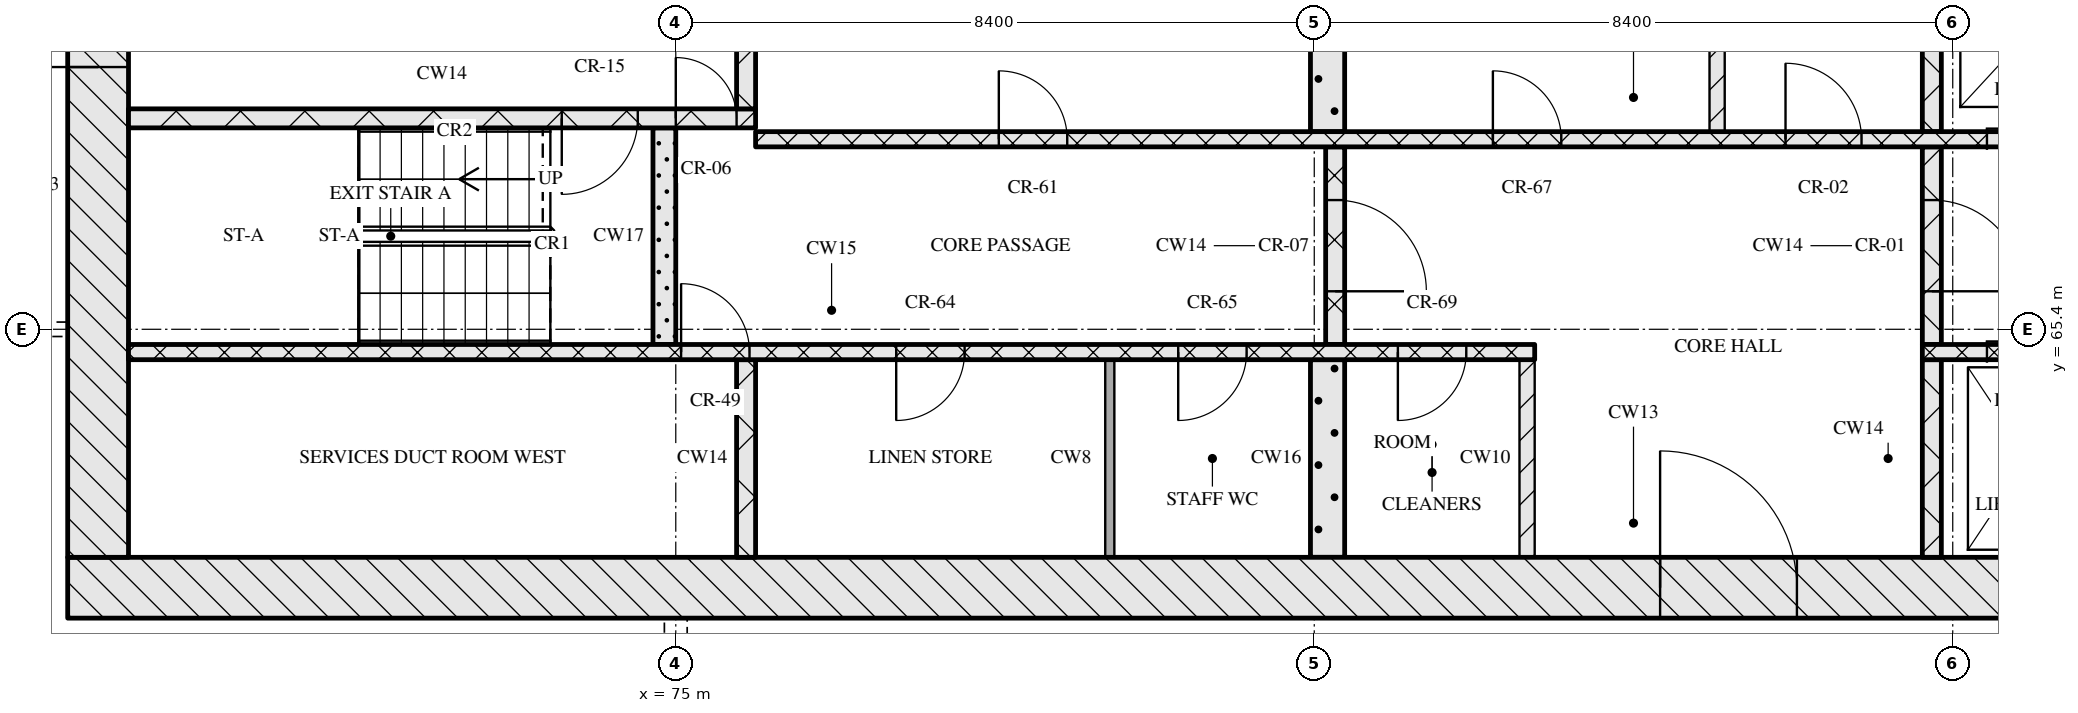
"""IFC4 building model, lengths in metres.
Left out: names, types, materials, properties, quantities, classifications, styles, units other than length and angle.
Written with IfcOpenShell. Run it as: python <this file> out.ifc"""

import sys

from ifc_helpers import new_model, si_unit, direction, frame, frame_2d, origin, place, context, subcontext, project, spatial, rectangle, extrude, element, fill, save


model = new_model("IFC4")
c1 = context("Model", 3, precision=1e-05, world=origin(), true_north=direction((0.0, 1.0)))
c2 = subcontext(c1, "Body", "Model", "MODEL_VIEW")
j1 = project(units=[si_unit("LENGTHUNIT", "METRE"), si_unit("PLANEANGLEUNIT", "RADIAN")], contexts=[c1])
p1 = place(None, origin())
s1 = spatial("IfcSite", under=j1, at=p1, CompositionType="ELEMENT")
p2 = place(p1, origin())
s2 = spatial("IfcBuilding", under=s1, at=p2, CompositionType="ELEMENT")
p3 = place(p2, frame((0.0, 0.0, 161.85)))
s3 = spatial("IfcBuildingStorey", under=s2, at=p3, CompositionType="ELEMENT", Elevation=161.85)
p4 = place(p3, frame((67.0, 62.0, 0.0), z_axis=(0.0, 0.0, 1.0), x_axis=(1.0, 0.0, 0.0)))
e1 = element("IfcWall", 1, at=p4, inside=s3, PredefinedType="SOLIDWALL", context=c2, shape_type="SweptSolid", body=[
    extrude(rectangle(XDim=41.2, YDim=0.8, at=frame_2d((20.6, 0.0))), origin(), (0.0, 0.0, 1.0), 3.32),
])
p5 = place(p4, frame((20.95, 0.0, 0.0)))
e2 = element("IfcOpeningElement", 2, at=p5, cuts=e1, PredefinedType="OPENING", context=c2, shape_type="SweptSolid", body=[
    extrude(rectangle(XDim=1.8, YDim=2.1, at=frame_2d((0.9, 1.05))), frame((0.0, 0.41, 0.0), z_axis=(0.0, -1.0, 0.0), x_axis=(1.0, 0.0, 0.0)), (0.0, 0.0, 1.0), 0.82),
])
p6 = place(p3, frame((67.4, 62.4, 0.0), z_axis=(0.0, 0.0, 1.0), x_axis=(0.0, 1.0, 0.0)))
e3 = element("IfcWall", 3, at=p6, inside=s3, PredefinedType="SOLIDWALL", context=c2, shape_type="SweptSolid", body=[
    extrude(rectangle(XDim=12.0, YDim=0.8, at=frame_2d((6.0, 0.0))), origin(), (0.0, 0.0, 1.0), 3.32),
])
p7 = place(p6, frame((6.45, 0.0, 0.0)))
e4 = element("IfcOpeningElement", 4, at=p7, cuts=e3, PredefinedType="OPENING", context=c2, shape_type="SweptSolid", body=[
    extrude(rectangle(XDim=1.2, YDim=2.1, at=frame_2d((0.6, 1.05))), frame((0.0, 0.41, 0.0), z_axis=(0.0, -1.0, 0.0), x_axis=(1.0, 0.0, 0.0)), (0.0, 0.0, 1.0), 0.82),
])
p8 = place(p3, frame((75.925, 62.4, 0.0), z_axis=(0.0, 0.0, 1.0), x_axis=(0.0, 1.0, 0.0)))
e5 = element("IfcWall", 5, at=p8, inside=s3, PredefinedType="SOLIDWALL", context=c2, shape_type="SweptSolid", body=[
    extrude(rectangle(XDim=2.6, YDim=0.25, at=frame_2d((1.3, 0.0))), origin(), (0.0, 0.0, 1.0), 3.32),
])
p9 = place(p3, frame((80.71, 62.4, 0.0), z_axis=(0.0, 0.0, 1.0), x_axis=(0.0, 1.0, 0.0)))
e6 = element("IfcWall", 6, at=p9, inside=s3, PredefinedType="PARTITIONING", context=c2, shape_type="SweptSolid", body=[
    extrude(rectangle(XDim=2.6, YDim=0.12, at=frame_2d((1.3, 0.0))), origin(), (0.0, 0.0, 1.0), 3.32),
])
p10 = place(p3, frame((83.575, 62.4, 0.0), z_axis=(0.0, 0.0, 1.0), x_axis=(0.0, 1.0, 0.0)))
e7 = element("IfcWall", 7, at=p10, inside=s3, PredefinedType="SOLIDWALL", context=c2, shape_type="SweptSolid", body=[
    extrude(rectangle(XDim=2.6, YDim=0.45, at=frame_2d((1.3, 0.0))), origin(), (0.0, 0.0, 1.0), 3.32),
])
p11 = place(p3, frame((86.2, 62.4, 0.0), z_axis=(0.0, 0.0, 1.0), x_axis=(0.0, 1.0, 0.0)))
e8 = element("IfcWall", 8, at=p11, inside=s3, PredefinedType="PARTITIONING", context=c2, shape_type="SweptSolid", body=[
    extrude(rectangle(XDim=2.6, YDim=0.2, at=frame_2d((1.3, 0.0))), origin(), (0.0, 0.0, 1.0), 3.32),
])
p12 = place(p3, frame((91.525, 62.4, 0.0), z_axis=(0.0, 0.0, 1.0), x_axis=(0.0, 1.0, 0.0)))
e9 = element("IfcWall", 9, at=p12, inside=s3, PredefinedType="SOLIDWALL", context=c2, shape_type="SweptSolid", body=[
    extrude(rectangle(XDim=2.6, YDim=0.25, at=frame_2d((1.3, 0.0))), origin(), (0.0, 0.0, 1.0), 3.32),
])
p13 = place(p3, frame((67.8, 65.1, 0.0), z_axis=(0.0, 0.0, 1.0), x_axis=(1.0, 0.0, 0.0)))
e10 = element("IfcWall", 10, at=p13, inside=s3, PredefinedType="SOLIDWALL", context=c2, shape_type="SweptSolid", body=[
    extrude(rectangle(XDim=18.5, YDim=0.2, at=frame_2d((9.25, 0.0))), origin(), (0.0, 0.0, 1.0), 3.32),
])
p14 = place(p13, frame((7.27, 0.0, 0.0)))
e11 = element("IfcOpeningElement", 11, at=p14, cuts=e10, PredefinedType="OPENING", context=c2, shape_type="SweptSolid", body=[
    extrude(rectangle(XDim=0.9, YDim=2.1, at=frame_2d((0.45, 1.05))), frame((0.0, 0.11, 0.0), z_axis=(0.0, -1.0, 0.0), x_axis=(1.0, 0.0, 0.0)), (0.0, 0.0, 1.0), 0.22),
])
p15 = place(p13, frame((10.1, 0.0, 0.0)))
e12 = element("IfcOpeningElement", 12, at=p15, cuts=e10, PredefinedType="OPENING", context=c2, shape_type="SweptSolid", body=[
    extrude(rectangle(XDim=0.9, YDim=2.1, at=frame_2d((0.45, 1.05))), frame((0.0, 0.11, 0.0), z_axis=(0.0, -1.0, 0.0), x_axis=(1.0, 0.0, 0.0)), (0.0, 0.0, 1.0), 0.22),
])
p16 = place(p13, frame((13.81, 0.0, 0.0)))
e13 = element("IfcOpeningElement", 13, at=p16, cuts=e10, PredefinedType="OPENING", context=c2, shape_type="SweptSolid", body=[
    extrude(rectangle(XDim=0.9, YDim=2.1, at=frame_2d((0.45, 1.05))), frame((0.0, 0.11, 0.0), z_axis=(0.0, -1.0, 0.0), x_axis=(1.0, 0.0, 0.0)), (0.0, 0.0, 1.0), 0.22),
])
p17 = place(p13, frame((16.7, 0.0, 0.0)))
e14 = element("IfcOpeningElement", 14, at=p17, cuts=e10, PredefinedType="OPENING", context=c2, shape_type="SweptSolid", body=[
    extrude(rectangle(XDim=0.9, YDim=2.1, at=frame_2d((0.45, 1.05))), frame((0.0, 0.11, 0.0), z_axis=(0.0, -1.0, 0.0), x_axis=(1.0, 0.0, 0.0)), (0.0, 0.0, 1.0), 0.22),
])
p18 = place(p3, frame((91.4, 65.1, 0.0), z_axis=(0.0, 0.0, 1.0), x_axis=(1.0, 0.0, 0.0)))
e15 = element("IfcWall", 15, at=p18, inside=s3, PredefinedType="SOLIDWALL", context=c2, shape_type="SweptSolid", body=[
    extrude(rectangle(XDim=16.0, YDim=0.2, at=frame_2d((8.0, 0.0))), origin(), (0.0, 0.0, 1.0), 3.32),
])
p19 = place(p18, frame((0.85, 0.0, 0.0)))
e16 = element("IfcOpeningElement", 16, at=p19, cuts=e15, PredefinedType="OPENING", context=c2, shape_type="SweptSolid", body=[
    extrude(rectangle(XDim=1.1, YDim=2.1, at=frame_2d((0.55, 1.05))), frame((0.0, 0.11, 0.0), z_axis=(0.0, -1.0, 0.0), x_axis=(1.0, 0.0, 0.0)), (0.0, 0.0, 1.0), 0.22),
])
p20 = place(p18, frame((3.35, 0.0, 0.0)))
e17 = element("IfcOpeningElement", 17, at=p20, cuts=e15, PredefinedType="OPENING", context=c2, shape_type="SweptSolid", body=[
    extrude(rectangle(XDim=1.1, YDim=2.1, at=frame_2d((0.55, 1.05))), frame((0.0, 0.11, 0.0), z_axis=(0.0, -1.0, 0.0), x_axis=(1.0, 0.0, 0.0)), (0.0, 0.0, 1.0), 0.22),
])
p21 = place(p18, frame((5.85, 0.0, 0.0)))
e18 = element("IfcOpeningElement", 18, at=p21, cuts=e15, PredefinedType="OPENING", context=c2, shape_type="SweptSolid", body=[
    extrude(rectangle(XDim=1.1, YDim=2.1, at=frame_2d((0.55, 1.05))), frame((0.0, 0.11, 0.0), z_axis=(0.0, -1.0, 0.0), x_axis=(1.0, 0.0, 0.0)), (0.0, 0.0, 1.0), 0.22),
])
p22 = place(p18, frame((7.83, 0.0, 0.0)))
e19 = element("IfcOpeningElement", 19, at=p22, cuts=e15, PredefinedType="OPENING", context=c2, shape_type="SweptSolid", body=[
    extrude(rectangle(XDim=0.9, YDim=2.1, at=frame_2d((0.45, 1.05))), frame((0.0, 0.11, 0.0), z_axis=(0.0, -1.0, 0.0), x_axis=(1.0, 0.0, 0.0)), (0.0, 0.0, 1.0), 0.22),
])
p23 = place(p3, frame((74.85, 65.2, 0.0), z_axis=(0.0, 0.0, 1.0), x_axis=(0.0, 1.0, 0.0)))
e20 = element("IfcWall", 20, at=p23, inside=s3, PredefinedType="SOLIDWALL", context=c2, shape_type="SweptSolid", body=[
    extrude(rectangle(XDim=2.85, YDim=0.3, at=frame_2d((1.425, 0.0))), origin(), (0.0, 0.0, 1.0), 3.32),
])
p24 = place(p3, frame((83.675, 65.2, 0.0), z_axis=(0.0, 0.0, 1.0), x_axis=(0.0, 1.0, 0.0)))
e21 = element("IfcWall", 21, at=p24, inside=s3, PredefinedType="SOLIDWALL", context=c2, shape_type="SweptSolid", body=[
    extrude(rectangle(XDim=2.6, YDim=0.25, at=frame_2d((1.3, 0.0))), origin(), (0.0, 0.0, 1.0), 3.32),
])
p25 = place(p24, frame((0.7, 0.0, 0.0)))
e22 = element("IfcOpeningElement", 22, at=p25, cuts=e21, PredefinedType="OPENING", context=c2, shape_type="SweptSolid", body=[
    extrude(rectangle(XDim=1.2, YDim=2.1, at=frame_2d((0.6, 1.05))), frame((0.0, 0.135, 0.0), z_axis=(0.0, -1.0, 0.0), x_axis=(1.0, 0.0, 0.0)), (0.0, 0.0, 1.0), 0.27),
])
p26 = place(p3, frame((91.525, 65.2, 0.0), z_axis=(0.0, 0.0, 1.0), x_axis=(0.0, 1.0, 0.0)))
e23 = element("IfcWall", 23, at=p26, inside=s3, PredefinedType="SOLIDWALL", context=c2, shape_type="SweptSolid", body=[
    extrude(rectangle(XDim=2.6, YDim=0.25, at=frame_2d((1.3, 0.0))), origin(), (0.0, 0.0, 1.0), 3.32),
])
p27 = place(p26, frame((0.7, 0.0, 0.0)))
e24 = element("IfcOpeningElement", 24, at=p27, cuts=e23, PredefinedType="OPENING", context=c2, shape_type="SweptSolid", body=[
    extrude(rectangle(XDim=1.2, YDim=2.1, at=frame_2d((0.6, 1.05))), frame((0.0, 0.135, 0.0), z_axis=(0.0, -1.0, 0.0), x_axis=(1.0, 0.0, 0.0)), (0.0, 0.0, 1.0), 0.27),
])
p28 = place(p3, frame((76.05, 67.9, 0.0), z_axis=(0.0, 0.0, 1.0), x_axis=(1.0, 0.0, 0.0)))
e25 = element("IfcWall", 25, at=p28, inside=s3, PredefinedType="SOLIDWALL", context=c2, shape_type="SweptSolid", body=[
    extrude(rectangle(XDim=23.1, YDim=0.2, at=frame_2d((11.55, 0.0))), origin(), (0.0, 0.0, 1.0), 3.32),
])
p29 = place(p28, frame((3.2, 0.0, 0.0)))
e26 = element("IfcOpeningElement", 26, at=p29, cuts=e25, PredefinedType="OPENING", context=c2, shape_type="SweptSolid", body=[
    extrude(rectangle(XDim=0.9, YDim=2.1, at=frame_2d((0.45, 1.05))), frame((0.0, 0.11, 0.0), z_axis=(0.0, -1.0, 0.0), x_axis=(1.0, 0.0, 0.0)), (0.0, 0.0, 1.0), 0.22),
])
p30 = place(p28, frame((9.7, 0.0, 0.0)))
e27 = element("IfcOpeningElement", 27, at=p30, cuts=e25, PredefinedType="OPENING", context=c2, shape_type="SweptSolid", body=[
    extrude(rectangle(XDim=0.9, YDim=2.1, at=frame_2d((0.45, 1.05))), frame((0.0, 0.11, 0.0), z_axis=(0.0, -1.0, 0.0), x_axis=(1.0, 0.0, 0.0)), (0.0, 0.0, 1.0), 0.22),
])
p31 = place(p28, frame((13.55, 0.0, 0.0)))
e28 = element("IfcOpeningElement", 28, at=p31, cuts=e25, PredefinedType="OPENING", context=c2, shape_type="SweptSolid", body=[
    extrude(rectangle(XDim=1.0, YDim=2.1, at=frame_2d((0.5, 1.05))), frame((0.0, 0.11, 0.0), z_axis=(0.0, -1.0, 0.0), x_axis=(1.0, 0.0, 0.0)), (0.0, 0.0, 1.0), 0.22),
])
p32 = place(p28, frame((16.2, 0.0, 0.0)))
e29 = element("IfcOpeningElement", 29, at=p32, cuts=e25, PredefinedType="OPENING", context=c2, shape_type="SweptSolid", body=[
    extrude(rectangle(XDim=1.1, YDim=2.1, at=frame_2d((0.55, 1.05))), frame((0.0, 0.11, 0.0), z_axis=(0.0, -1.0, 0.0), x_axis=(1.0, 0.0, 0.0)), (0.0, 0.0, 1.0), 0.22),
])
p33 = place(p28, frame((18.7, 0.0, 0.0)))
e30 = element("IfcOpeningElement", 30, at=p33, cuts=e25, PredefinedType="OPENING", context=c2, shape_type="SweptSolid", body=[
    extrude(rectangle(XDim=1.1, YDim=2.1, at=frame_2d((0.55, 1.05))), frame((0.0, 0.11, 0.0), z_axis=(0.0, -1.0, 0.0), x_axis=(1.0, 0.0, 0.0)), (0.0, 0.0, 1.0), 0.22),
])
p34 = place(p28, frame((21.2, 0.0, 0.0)))
e31 = element("IfcOpeningElement", 31, at=p34, cuts=e25, PredefinedType="OPENING", context=c2, shape_type="SweptSolid", body=[
    extrude(rectangle(XDim=1.1, YDim=2.1, at=frame_2d((0.55, 1.05))), frame((0.0, 0.11, 0.0), z_axis=(0.0, -1.0, 0.0), x_axis=(1.0, 0.0, 0.0)), (0.0, 0.0, 1.0), 0.22),
])
p35 = place(p3, frame((83.575, 68.0, 0.0), z_axis=(0.0, 0.0, 1.0), x_axis=(0.0, 1.0, 0.0)))
e32 = element("IfcWall", 32, at=p35, inside=s3, PredefinedType="SOLIDWALL", context=c2, shape_type="SweptSolid", body=[
    extrude(rectangle(XDim=2.6, YDim=0.45, at=frame_2d((1.3, 0.0))), origin(), (0.0, 0.0, 1.0), 3.32),
])
p36 = place(p3, frame((88.7, 68.0, 0.0), z_axis=(0.0, 0.0, 1.0), x_axis=(0.0, 1.0, 0.0)))
e33 = element("IfcWall", 33, at=p36, inside=s3, PredefinedType="PARTITIONING", context=c2, shape_type="SweptSolid", body=[
    extrude(rectangle(XDim=2.6, YDim=0.2, at=frame_2d((1.3, 0.0))), origin(), (0.0, 0.0, 1.0), 3.32),
])
p37 = place(p3, frame((91.525, 68.0, 0.0), z_axis=(0.0, 0.0, 1.0), x_axis=(0.0, 1.0, 0.0)))
e34 = element("IfcWall", 34, at=p37, inside=s3, PredefinedType="SOLIDWALL", context=c2, shape_type="SweptSolid", body=[
    extrude(rectangle(XDim=2.6, YDim=0.25, at=frame_2d((1.3, 0.0))), origin(), (0.0, 0.0, 1.0), 3.32),
])
p38 = place(p3, frame((67.8, 68.175, 0.0), z_axis=(0.0, 0.0, 1.0), x_axis=(1.0, 0.0, 0.0)))
e35 = element("IfcWall", 35, at=p38, inside=s3, PredefinedType="SOLIDWALL", context=c2, shape_type="SweptSolid", body=[
    extrude(rectangle(XDim=8.25, YDim=0.25, at=frame_2d((4.125, 0.0))), origin(), (0.0, 0.0, 1.0), 3.32),
])
p39 = place(p38, frame((5.7, 0.0, 0.0)))
e36 = element("IfcOpeningElement", 36, at=p39, cuts=e35, PredefinedType="OPENING", context=c2, shape_type="SweptSolid", body=[
    extrude(rectangle(XDim=1.0, YDim=2.1, at=frame_2d((0.5, 1.05))), frame((0.0, 0.135, 0.0), z_axis=(0.0, -1.0, 0.0), x_axis=(1.0, 0.0, 0.0)), (0.0, 0.0, 1.0), 0.27),
])
p40 = place(p38, frame((7.2, 0.0, 0.0)))
e37 = element("IfcOpeningElement", 37, at=p40, cuts=e35, PredefinedType="OPENING", context=c2, shape_type="SweptSolid", body=[
    extrude(rectangle(XDim=0.8, YDim=2.1, at=frame_2d((0.4, 1.05))), frame((0.0, 0.135, 0.0), z_axis=(0.0, -1.0, 0.0), x_axis=(1.0, 0.0, 0.0)), (0.0, 0.0, 1.0), 0.27),
])
p41 = place(p3, frame((75.925, 68.3, 0.0), z_axis=(0.0, 0.0, 1.0), x_axis=(0.0, 1.0, 0.0)))
e38 = element("IfcWall", 38, at=p41, inside=s3, PredefinedType="SOLIDWALL", context=c2, shape_type="SweptSolid", body=[
    extrude(rectangle(XDim=2.3, YDim=0.25, at=frame_2d((1.15, 0.0))), origin(), (0.0, 0.0, 1.0), 3.32),
])
p42 = place(p5, origin())
e39 = element("IfcDoor", 39, at=p42, inside=s3, OperationType="DOUBLE_DOOR_SINGLE_SWING", PredefinedType="DOOR", context=c2, shape_type="SweptSolid", body=[
    extrude(rectangle(XDim=1.8, YDim=2.1, at=frame_2d((0.9, 1.05))), frame((0.0, 0.025, 0.0), z_axis=(0.0, -1.0, 0.0), x_axis=(1.0, 0.0, 0.0)), (0.0, 0.0, 1.0), 0.05),
])
fill(e2, e39)
p43 = place(p14, origin())
e40 = element("IfcDoor", 40, at=p43, inside=s3, OperationType="SINGLE_SWING_LEFT", PredefinedType="DOOR", context=c2, shape_type="SweptSolid", body=[
    extrude(rectangle(XDim=0.9, YDim=2.1, at=frame_2d((0.45, 1.05))), frame((0.0, 0.025, 0.0), z_axis=(0.0, -1.0, 0.0), x_axis=(1.0, 0.0, 0.0)), (0.0, 0.0, 1.0), 0.05),
])
fill(e11, e40)
p44 = place(p15, origin())
e41 = element("IfcDoor", 41, at=p44, inside=s3, OperationType="SINGLE_SWING_RIGHT", PredefinedType="DOOR", context=c2, shape_type="SweptSolid", body=[
    extrude(rectangle(XDim=0.9, YDim=2.1, at=frame_2d((0.45, 1.05))), frame((0.0, 0.025, 0.0), z_axis=(0.0, -1.0, 0.0), x_axis=(1.0, 0.0, 0.0)), (0.0, 0.0, 1.0), 0.05),
])
fill(e12, e41)
p45 = place(p16, origin())
e42 = element("IfcDoor", 42, at=p45, inside=s3, OperationType="SINGLE_SWING_RIGHT", PredefinedType="DOOR", context=c2, shape_type="SweptSolid", body=[
    extrude(rectangle(XDim=0.9, YDim=2.1, at=frame_2d((0.45, 1.05))), frame((0.0, 0.025, 0.0), z_axis=(0.0, -1.0, 0.0), x_axis=(1.0, 0.0, 0.0)), (0.0, 0.0, 1.0), 0.05),
])
fill(e13, e42)
p46 = place(p17, origin())
e43 = element("IfcDoor", 43, at=p46, inside=s3, OperationType="SINGLE_SWING_RIGHT", PredefinedType="DOOR", context=c2, shape_type="SweptSolid", body=[
    extrude(rectangle(XDim=0.9, YDim=2.1, at=frame_2d((0.45, 1.05))), frame((0.0, 0.025, 0.0), z_axis=(0.0, -1.0, 0.0), x_axis=(1.0, 0.0, 0.0)), (0.0, 0.0, 1.0), 0.05),
])
fill(e14, e43)
p47 = place(p19, origin())
e44 = element("IfcDoor", 44, at=p47, inside=s3, OperationType="SLIDING_TO_LEFT", PredefinedType="DOOR", context=c2, shape_type="SweptSolid", body=[
    extrude(rectangle(XDim=1.1, YDim=2.1, at=frame_2d((0.55, 1.05))), frame((0.0, 0.025, 0.0), z_axis=(0.0, -1.0, 0.0), x_axis=(1.0, 0.0, 0.0)), (0.0, 0.0, 1.0), 0.05),
])
fill(e16, e44)
p48 = place(p25, origin())
e45 = element("IfcDoor", 45, at=p48, inside=s3, OperationType="SINGLE_SWING_RIGHT", PredefinedType="DOOR", context=c2, shape_type="SweptSolid", body=[
    extrude(rectangle(XDim=1.2, YDim=2.1, at=frame_2d((0.6, 1.05))), frame((0.0, 0.025, 0.0), z_axis=(0.0, -1.0, 0.0), x_axis=(1.0, 0.0, 0.0)), (0.0, 0.0, 1.0), 0.05),
])
fill(e22, e45)
p49 = place(p27, origin())
e46 = element("IfcDoor", 46, at=p49, inside=s3, OperationType="SINGLE_SWING_RIGHT", PredefinedType="DOOR", context=c2, shape_type="SweptSolid", body=[
    extrude(rectangle(XDim=1.2, YDim=2.1, at=frame_2d((0.6, 1.05))), frame((0.0, 0.025, 0.0), z_axis=(0.0, -1.0, 0.0), x_axis=(1.0, 0.0, 0.0)), (0.0, 0.0, 1.0), 0.05),
])
fill(e24, e46)
p50 = place(p29, origin())
e47 = element("IfcDoor", 47, at=p50, inside=s3, OperationType="SINGLE_SWING_LEFT", PredefinedType="DOOR", context=c2, shape_type="SweptSolid", body=[
    extrude(rectangle(XDim=0.9, YDim=2.1, at=frame_2d((0.45, 1.05))), frame((0.0, 0.025, 0.0), z_axis=(0.0, -1.0, 0.0), x_axis=(1.0, 0.0, 0.0)), (0.0, 0.0, 1.0), 0.05),
])
fill(e26, e47)
p51 = place(p30, origin())
e48 = element("IfcDoor", 48, at=p51, inside=s3, OperationType="SINGLE_SWING_LEFT", PredefinedType="DOOR", context=c2, shape_type="SweptSolid", body=[
    extrude(rectangle(XDim=0.9, YDim=2.1, at=frame_2d((0.45, 1.05))), frame((0.0, 0.025, 0.0), z_axis=(0.0, -1.0, 0.0), x_axis=(1.0, 0.0, 0.0)), (0.0, 0.0, 1.0), 0.05),
])
fill(e27, e48)
p52 = place(p31, origin())
e49 = element("IfcDoor", 49, at=p52, inside=s3, OperationType="SINGLE_SWING_LEFT", PredefinedType="DOOR", context=c2, shape_type="SweptSolid", body=[
    extrude(rectangle(XDim=1.0, YDim=2.1, at=frame_2d((0.5, 1.05))), frame((0.0, 0.025, 0.0), z_axis=(0.0, -1.0, 0.0), x_axis=(1.0, 0.0, 0.0)), (0.0, 0.0, 1.0), 0.05),
])
fill(e28, e49)
p53 = place(p32, origin())
e50 = element("IfcDoor", 50, at=p53, inside=s3, OperationType="SLIDING_TO_RIGHT", PredefinedType="DOOR", context=c2, shape_type="SweptSolid", body=[
    extrude(rectangle(XDim=1.1, YDim=2.1, at=frame_2d((0.55, 1.05))), frame((0.0, 0.025, 0.0), z_axis=(0.0, -1.0, 0.0), x_axis=(1.0, 0.0, 0.0)), (0.0, 0.0, 1.0), 0.05),
])
fill(e29, e50)
p54 = place(p39, origin())
e51 = element("IfcDoor", 51, at=p54, inside=s3, OperationType="SINGLE_SWING_RIGHT", PredefinedType="DOOR", context=c2, shape_type="SweptSolid", body=[
    extrude(rectangle(XDim=1.0, YDim=2.1, at=frame_2d((0.5, 1.05))), frame((0.0, 0.025, 0.0), z_axis=(0.0, -1.0, 0.0), x_axis=(1.0, 0.0, 0.0)), (0.0, 0.0, 1.0), 0.05),
])
fill(e36, e51)
p55 = place(p40, origin())
e52 = element("IfcDoor", 52, at=p55, inside=s3, OperationType="SINGLE_SWING_LEFT", PredefinedType="DOOR", context=c2, shape_type="SweptSolid", body=[
    extrude(rectangle(XDim=0.8, YDim=2.1, at=frame_2d((0.4, 1.05))), frame((0.0, 0.025, 0.0), z_axis=(0.0, -1.0, 0.0), x_axis=(1.0, 0.0, 0.0)), (0.0, 0.0, 1.0), 0.05),
])
fill(e37, e52)
p56 = place(p7, origin())
e53 = element("IfcDoor", 53, at=p56, inside=s3, OperationType="SINGLE_SWING_LEFT", PredefinedType="DOOR", context=c2, shape_type="SweptSolid", body=[
    extrude(rectangle(XDim=1.2, YDim=2.1, at=frame_2d((0.6, 1.05))), frame((0.0, 0.025, 0.0), z_axis=(0.0, -1.0, 0.0), x_axis=(1.0, 0.0, 0.0)), (0.0, 0.0, 1.0), 0.05),
])
fill(e4, e53)
save(model, sys.argv[1])
